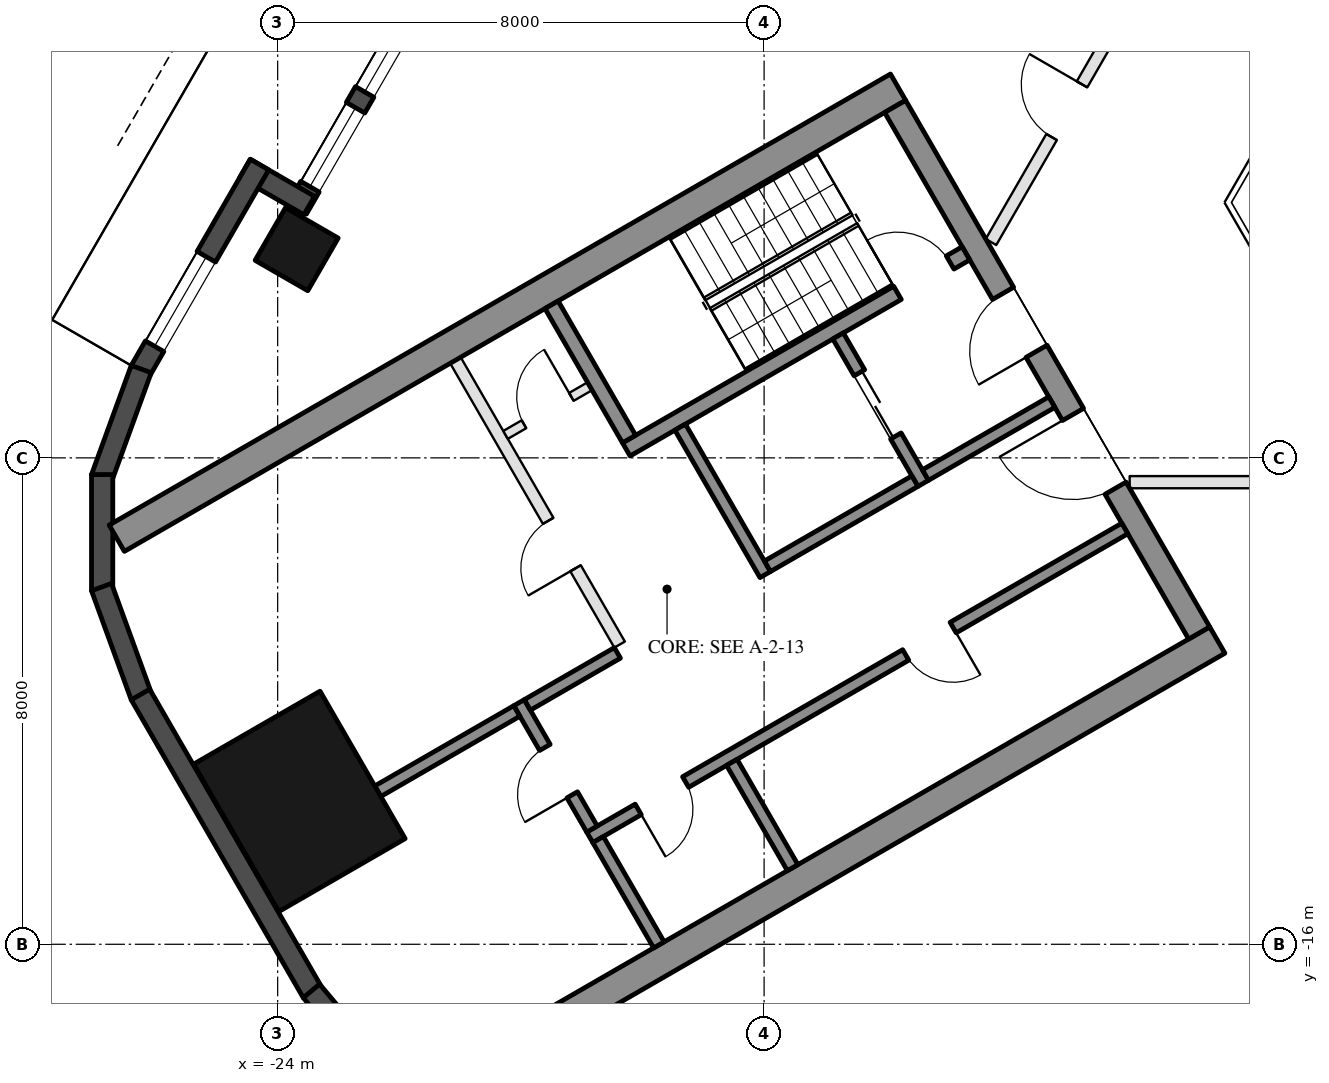
"""IFC4 building model, lengths in metres.
Left out: names, types, materials, properties, quantities, classifications, styles, units other than length and angle.
Written with IfcOpenShell. Run it as: python <this file> out.ifc"""

import sys

from ifc_helpers import new_model, si_unit, direction, frame, frame_2d, origin, origin_2d, place, context, subcontext, project, spatial, rectangle, hollow_rectangle, extrude, element, fill, save


model = new_model("IFC4")
c1 = context("Model", 3, precision=1e-05, world=origin(), true_north=direction((0.0, 1.0)))
c2 = subcontext(c1, "Body", "Model", "MODEL_VIEW")
j1 = project(units=[si_unit("LENGTHUNIT", "METRE"), si_unit("PLANEANGLEUNIT", "RADIAN")], contexts=[c1])
p1 = place(None, origin())
s1 = spatial("IfcSite", under=j1, at=p1, CompositionType="ELEMENT")
p2 = place(p1, origin())
s2 = spatial("IfcBuilding", under=s1, at=p2, CompositionType="ELEMENT")
p3 = place(p2, frame((0.0, 0.0, 61.3)))
s3 = spatial("IfcBuildingStorey", under=s2, at=p3, CompositionType="ELEMENT", Elevation=61.3)
p4 = place(p3, frame((-23.688, -4.568, 0.0), z_axis=(0.0, 0.0, 1.0), x_axis=(0.5, 0.866025403784, 0.0)))
e1 = element("IfcColumn", 1, at=p4, inside=s3, PredefinedType="COLUMN", context=c2, shape_type="SweptSolid", body=[
    extrude(hollow_rectangle(XDim=1.0, YDim=1.0, WallThickness=0.045, at=origin_2d()), origin(), (0.0, 0.0, 1.0), 3.7),
])
p5 = place(p3, frame((-23.643, -13.65, 0.0), z_axis=(0.0, 0.0, 1.0), x_axis=(-0.5, 0.866025403784, 0.0)))
e2 = element("IfcColumn", 2, at=p5, inside=s3, PredefinedType="COLUMN", context=c2, shape_type="SweptSolid", body=[
    extrude(hollow_rectangle(XDim=2.8, YDim=2.4, WallThickness=0.07, at=origin_2d()), origin(), (0.0, 0.0, 1.0), 3.7),
])
p6 = place(p3, frame((-20.309, 1.934, 0.0), z_axis=(0.0, 0.0, 1.0), x_axis=(-0.499992114976, -0.866029956157, 0.0)))
e3 = element("IfcWall", 3, at=p6, inside=s3, PredefinedType="SOLIDWALL", context=c2, shape_type="SweptSolid", body=[
    extrude(rectangle(XDim=6.74, YDim=0.35, at=frame_2d((3.37, 0.0))), origin(), (0.0, 0.0, 1.0), 3.55),
])
p7 = place(p6, frame((0.32, 0.0, 0.0)))
e4 = element("IfcOpeningElement", 4, at=p7, cuts=e3, PredefinedType="OPENING", context=c2, shape_type="SweptSolid", body=[
    extrude(rectangle(XDim=2.4, YDim=2.4, at=frame_2d((1.2, 1.2))), frame((0.0, 0.185, 0.0), z_axis=(0.0, -1.0, 0.0), x_axis=(1.0, 0.0, 0.0)), (0.0, 0.0, 1.0), 0.37),
])
p8 = place(p6, frame((3.02, 0.0, 0.3)))
e5 = element("IfcOpeningElement", 5, at=p8, cuts=e3, PredefinedType="OPENING", context=c2, shape_type="SweptSolid", body=[
    extrude(rectangle(XDim=1.5, YDim=2.65, at=frame_2d((0.75, 1.325))), frame((0.0, 0.185, 0.0), z_axis=(0.0, -1.0, 0.0), x_axis=(1.0, 0.0, 0.0)), (0.0, 0.0, 1.0), 0.37),
])
p9 = place(p6, frame((4.82, 0.0, 0.3)))
e6 = element("IfcOpeningElement", 6, at=p9, cuts=e3, PredefinedType="OPENING", context=c2, shape_type="SweptSolid", body=[
    extrude(rectangle(XDim=1.5, YDim=2.65, at=frame_2d((0.75, 1.325))), frame((0.0, 0.185, 0.0), z_axis=(0.0, -1.0, 0.0), x_axis=(1.0, 0.0, 0.0)), (0.0, 0.0, 1.0), 0.37),
])
p10 = place(p3, frame((-23.481, -3.85, 0.0), z_axis=(0.0, 0.0, 1.0), x_axis=(-0.866092288191, 0.499884134912, 0.0)))
e7 = element("IfcWall", 7, at=p10, inside=s3, PredefinedType="SOLIDWALL", context=c2, shape_type="SweptSolid", body=[
    extrude(rectangle(XDim=1.22, YDim=0.35, at=frame_2d((0.61, 0.0))), origin(), (0.0, 0.0, 1.0), 3.55),
])
p11 = place(p3, frame((-24.299, -3.176, 0.0), z_axis=(0.0, 0.0, 1.0), x_axis=(-0.500028278809, -0.866009076391, 0.0)))
e8 = element("IfcWall", 8, at=p11, inside=s3, PredefinedType="SOLIDWALL", context=c2, shape_type="SweptSolid", body=[
    extrude(rectangle(XDim=3.916, YDim=0.35, at=frame_2d((1.958, 0.0))), origin(), (0.0, 0.0, 1.0), 3.55),
])
p12 = place(p11, frame((1.75, 0.0, 0.3)))
e9 = element("IfcOpeningElement", 9, at=p12, cuts=e8, PredefinedType="OPENING", context=c2, shape_type="SweptSolid", body=[
    extrude(rectangle(XDim=1.7, YDim=2.65, at=frame_2d((0.85, 1.325))), frame((0.0, 0.185, 0.0), z_axis=(0.0, -1.0, 0.0), x_axis=(1.0, 0.0, 0.0)), (0.0, 0.0, 1.0), 0.37),
])
for number, where, z_axis, x_axis in (
    (10, (-26.244, -6.54, 0.0), (0.0, 0.0, 1.0), (-0.342, -0.94, 0.0)),
    (11, (-26.886, -8.275, 0.0), (0.0, 0.0, 1.0), (0.0, -1.0, 0.0)),
    (12, (-26.897, -10.125, 0.0), (0.0, 0.0, 1.0), (0.342, -0.94, 0.0)),
):
    element("IfcWall", number, at=place(p3, frame(where, z_axis=z_axis, x_axis=x_axis)), inside=s3, PredefinedType="SOLIDWALL", context=c2, shape_type="SweptSolid", body=[
        extrude(rectangle(XDim=1.91, YDim=0.35, at=frame_2d((0.955, 0.0))), origin(), (0.0, 0.0, 1.0), 3.55),
    ])
p13 = place(p3, frame((-26.257, -11.893, 0.0), z_axis=(0.0, 0.0, 1.0), x_axis=(0.500018773155, -0.866014564827, 0.0)))
e13 = element("IfcWall", 13, at=p13, inside=s3, PredefinedType="SOLIDWALL", context=c2, shape_type="SweptSolid", body=[
    extrude(rectangle(XDim=5.658, YDim=0.35, at=frame_2d((2.829, 0.0))), origin(), (0.0, 0.0, 1.0), 3.55),
])
p14 = place(p3, frame((-23.445, -16.768, 0.0), z_axis=(0.0, 0.0, 1.0), x_axis=(0.642733291068, -0.76609001857, 0.0)))
e14 = element("IfcWall", 14, at=p14, inside=s3, PredefinedType="SOLIDWALL", context=c2, shape_type="SweptSolid", body=[
    extrude(rectangle(XDim=1.91, YDim=0.35, at=frame_2d((0.955, 0.0))), origin(), (0.0, 0.0, 1.0), 3.55),
])
for number, where, z_axis, x_axis in (
    (15, (-13.797, -1.903, 0.0), (0.0, 0.0, 1.0), (-0.866, -0.5, 0.0)),
    (16, (-8.547, -10.997, 0.0), (0.0, 0.0, 1.0), (-0.866, -0.5, 0.0)),
):
    element("IfcWall", number, at=place(p3, frame(where, z_axis=z_axis, x_axis=x_axis)), inside=s3, PredefinedType="SHEAR", context=c2, shape_type="SweptSolid", body=[
        extrude(rectangle(XDim=14.837, YDim=0.5, at=frame_2d((7.418, 0.0))), origin(), (0.0, 0.0, 1.0), 3.5),
    ])
p15 = place(p3, frame((-13.845, -2.22, 0.0), z_axis=(0.0, 0.0, 1.0), x_axis=(0.500004234368, -0.866022959057, 0.0)))
e17 = element("IfcWall", 17, at=p15, inside=s3, PredefinedType="SHEAR", context=c2, shape_type="SweptSolid", body=[
    extrude(rectangle(XDim=10.0, YDim=0.4, at=frame_2d((5.0, 0.0))), origin(), (0.0, 0.0, 1.0), 3.5),
])
p16 = place(p15, frame((3.55, 0.0, 0.0)))
e18 = element("IfcOpeningElement", 18, at=p16, cuts=e17, PredefinedType="OPENING", context=c2, shape_type="SweptSolid", body=[
    extrude(rectangle(XDim=1.1, YDim=2.1, at=frame_2d((0.55, 1.05))), frame((0.0, 0.21, 0.0), z_axis=(0.0, -1.0, 0.0), x_axis=(1.0, 0.0, 0.0)), (0.0, 0.0, 1.0), 0.42),
])
p17 = place(p15, frame((5.85, 0.0, 0.0)))
e19 = element("IfcOpeningElement", 19, at=p17, cuts=e17, PredefinedType="OPENING", context=c2, shape_type="SweptSolid", body=[
    extrude(rectangle(XDim=1.4, YDim=2.1, at=frame_2d((0.7, 1.05))), frame((0.0, 0.21, 0.0), z_axis=(0.0, -1.0, 0.0), x_axis=(1.0, 0.0, 0.0)), (0.0, 0.0, 1.0), 0.42),
])
p18 = place(p3, frame((-12.681, -4.636, 0.0), z_axis=(0.0, 0.0, 1.0), x_axis=(-0.866021702275, -0.500006411147, 0.0)))
e20 = element("IfcWall", 20, at=p18, inside=s3, PredefinedType="SHEAR", context=c2, shape_type="SweptSolid", body=[
    extrude(rectangle(XDim=6.45, YDim=0.25, at=frame_2d((3.225, 0.0))), origin(), (0.0, 0.0, 1.0), 3.5),
])
p19 = place(p18, frame((0.3, 0.0, 0.0)))
e21 = element("IfcOpeningElement", 21, at=p19, cuts=e20, PredefinedType="OPENING", context=c2, shape_type="SweptSolid", body=[
    extrude(rectangle(XDim=1.0, YDim=2.1, at=frame_2d((0.5, 1.05))), frame((0.0, 0.135, 0.0), z_axis=(0.0, -1.0, 0.0), x_axis=(1.0, 0.0, 0.0)), (0.0, 0.0, 1.0), 0.27),
])
p20 = place(p3, frame((-19.496, -5.482, 0.0), z_axis=(0.0, 0.0, 1.0), x_axis=(0.499990435942, -0.866030925526, 0.0)))
e22 = element("IfcWall", 22, at=p20, inside=s3, PredefinedType="SHEAR", context=c2, shape_type="SweptSolid", body=[
    extrude(rectangle(XDim=2.55, YDim=0.25, at=frame_2d((1.275, 0.0))), origin(), (0.0, 0.0, 1.0), 3.5),
])
p21 = place(p3, frame((-17.381, -7.495, 0.0), z_axis=(0.0, 0.0, 1.0), x_axis=(0.500011755427, -0.866018616679, 0.0)))
e23 = element("IfcWall", 23, at=p21, inside=s3, PredefinedType="SHEAR", context=c2, shape_type="SweptSolid", body=[
    extrude(rectangle(XDim=2.8, YDim=0.2, at=frame_2d((1.4, 0.0))), origin(), (0.0, 0.0, 1.0), 3.5),
])
p22 = place(p3, frame((-14.783, -5.995, 0.0), z_axis=(0.0, 0.0, 1.0), x_axis=(0.49994636267, -0.866056369097, 0.0)))
e24 = element("IfcWall", 24, at=p22, inside=s3, PredefinedType="SHEAR", context=c2, shape_type="SweptSolid", body=[
    extrude(rectangle(XDim=2.8, YDim=0.2, at=frame_2d((1.4, 0.0))), origin(), (0.0, 0.0, 1.0), 3.5),
])
p23 = place(p22, frame((0.7, 0.0, 0.0)))
e25 = element("IfcOpeningElement", 25, at=p23, cuts=e24, PredefinedType="OPENING", context=c2, shape_type="SweptSolid", body=[
    extrude(rectangle(XDim=1.2, YDim=2.1, at=frame_2d((0.6, 1.05))), frame((0.0, 0.11, 0.0), z_axis=(0.0, -1.0, 0.0), x_axis=(1.0, 0.0, 0.0)), (0.0, 0.0, 1.0), 0.22),
])
p24 = place(p3, frame((-13.52, -8.383, 0.0), z_axis=(0.0, 0.0, 1.0), x_axis=(-0.866034573852, -0.49998411664, 0.0)))
e26 = element("IfcWall", 26, at=p24, inside=s3, PredefinedType="SHEAR", context=c2, shape_type="SweptSolid", body=[
    extrude(rectangle(XDim=2.8, YDim=0.2, at=frame_2d((1.4, 0.0))), origin(), (0.0, 0.0, 1.0), 3.5),
])
p25 = place(p3, frame((-11.268, -7.083, 0.0), z_axis=(0.0, 0.0, 1.0), x_axis=(-0.866050077142, -0.499957262057, 0.0)))
e27 = element("IfcWall", 27, at=p25, inside=s3, PredefinedType="SHEAR", context=c2, shape_type="SweptSolid", body=[
    extrude(rectangle(XDim=2.4, YDim=0.2, at=frame_2d((1.2, 0.0))), origin(), (0.0, 0.0, 1.0), 3.5),
])
p26 = place(p3, frame((-10.068, -9.162, 0.0), z_axis=(0.0, 0.0, 1.0), x_axis=(-0.866032725843, -0.499987317609, 0.0)))
e28 = element("IfcWall", 28, at=p26, inside=s3, PredefinedType="SHEAR", context=c2, shape_type="SweptSolid", body=[
    extrude(rectangle(XDim=10.16, YDim=0.2, at=frame_2d((5.08, 0.0))), origin(), (0.0, 0.0, 1.0), 3.5),
])
p27 = place(p26, frame((3.26, 0.0, 0.0)))
e29 = element("IfcOpeningElement", 29, at=p27, cuts=e28, PredefinedType="OPENING", context=c2, shape_type="SweptSolid", body=[
    extrude(rectangle(XDim=0.9, YDim=2.1, at=frame_2d((0.45, 1.05))), frame((0.0, 0.11, 0.0), z_axis=(0.0, -1.0, 0.0), x_axis=(1.0, 0.0, 0.0)), (0.0, 0.0, 1.0), 0.22),
])
p28 = place(p26, frame((8.34, 0.0, 0.0)))
e30 = element("IfcOpeningElement", 30, at=p28, cuts=e28, PredefinedType="OPENING", context=c2, shape_type="SweptSolid", body=[
    extrude(rectangle(XDim=0.9, YDim=2.1, at=frame_2d((0.45, 1.05))), frame((0.0, 0.11, 0.0), z_axis=(0.0, -1.0, 0.0), x_axis=(1.0, 0.0, 0.0)), (0.0, 0.0, 1.0), 0.22),
])
p29 = place(p3, frame((-20.031, -12.026, 0.0), z_axis=(0.0, 0.0, 1.0), x_axis=(0.500033551112, -0.866006032174, 0.0)))
e31 = element("IfcWall", 31, at=p29, inside=s3, PredefinedType="SHEAR", context=c2, shape_type="SweptSolid", body=[
    extrude(rectangle(XDim=2.4, YDim=0.2, at=frame_2d((1.2, 0.0))), origin(), (0.0, 0.0, 1.0), 3.5),
])
p30 = place(p29, frame((0.85, 0.0, 0.0)))
e32 = element("IfcOpeningElement", 32, at=p30, cuts=e31, PredefinedType="OPENING", context=c2, shape_type="SweptSolid", body=[
    extrude(rectangle(XDim=0.9, YDim=2.1, at=frame_2d((0.45, 1.05))), frame((0.0, 0.11, 0.0), z_axis=(0.0, -1.0, 0.0), x_axis=(1.0, 0.0, 0.0)), (0.0, 0.0, 1.0), 0.22),
])
p31 = place(p3, frame((-18.413, -11.208, 0.0), z_axis=(0.0, 0.0, 1.0), x_axis=(-0.866038183914, -0.499977863513, 0.0)))
e33 = element("IfcWall", 33, at=p31, inside=s3, PredefinedType="SHEAR", context=c2, shape_type="SweptSolid", body=[
    extrude(rectangle(XDim=1.71, YDim=0.2, at=frame_2d((0.855, 0.0))), origin(), (0.0, 0.0, 1.0), 3.5),
])
for number, where, z_axis, x_axis in (
    (34, (-16.531, -13.008, 0.0), (0.0, 0.0, 1.0), (0.5, -0.866, 0.0)),
    (35, (-18.73, -14.278, 0.0), (0.0, 0.0, 1.0), (0.5, -0.866, 0.0)),
):
    element("IfcWall", number, at=place(p3, frame(where, z_axis=z_axis, x_axis=x_axis)), inside=s3, PredefinedType="SHEAR", context=c2, shape_type="SweptSolid", body=[
        extrude(rectangle(XDim=2.0, YDim=0.2, at=frame_2d((1.0, 0.0))), origin(), (0.0, 0.0, 1.0), 3.5),
    ])
p32 = place(p3, frame((-20.067, -12.163, 0.0), z_axis=(0.0, 0.0, 1.0), x_axis=(-0.866060851709, -0.499938597367, 0.0)))
e36 = element("IfcWall", 36, at=p32, inside=s3, PredefinedType="SHEAR", context=c2, shape_type="SweptSolid", body=[
    extrude(rectangle(XDim=2.64, YDim=0.2, at=frame_2d((1.32, 0.0))), origin(), (0.0, 0.0, 1.0), 3.5),
])
p33 = place(p3, frame((-21.076, -6.395, 0.0), z_axis=(0.0, 0.0, 1.0), x_axis=(0.50001468107, -0.866016927499, 0.0)))
e37 = element("IfcWall", 37, at=p33, inside=s3, PredefinedType="PARTITIONING", context=c2, shape_type="SweptSolid", body=[
    extrude(rectangle(XDim=5.4, YDim=0.2, at=frame_2d((2.7, 0.0))), origin(), (0.0, 0.0, 1.0), 3.5),
])
p34 = place(p33, frame((3.05, 0.0, 0.0)))
e38 = element("IfcOpeningElement", 38, at=p34, cuts=e37, PredefinedType="OPENING", context=c2, shape_type="SweptSolid", body=[
    extrude(rectangle(XDim=0.9, YDim=2.1, at=frame_2d((0.45, 1.05))), frame((0.0, 0.11, 0.0), z_axis=(0.0, -1.0, 0.0), x_axis=(1.0, 0.0, 0.0)), (0.0, 0.0, 1.0), 0.22),
])
p35 = place(p3, frame((-18.866, -6.822, 0.0), z_axis=(0.0, 0.0, 1.0), x_axis=(-0.866028054938, -0.499995408039, 0.0)))
e39 = element("IfcWall", 39, at=p35, inside=s3, PredefinedType="PARTITIONING", context=c2, shape_type="SweptSolid", body=[
    extrude(rectangle(XDim=1.6, YDim=0.15, at=frame_2d((0.8, 0.0))), origin(), (0.0, 0.0, 1.0), 3.5),
])
p36 = place(p35, frame((0.35, 0.0, 0.0)))
e40 = element("IfcOpeningElement", 40, at=p36, cuts=e39, PredefinedType="OPENING", context=c2, shape_type="SweptSolid", body=[
    extrude(rectangle(XDim=0.9, YDim=2.1, at=frame_2d((0.45, 1.05))), frame((0.0, 0.085, 0.0), z_axis=(0.0, -1.0, 0.0), x_axis=(1.0, 0.0, 0.0)), (0.0, 0.0, 1.0), 0.17),
])
p37 = place(p3, frame((-0.1, -8.4, 0.0), z_axis=(0.0, 0.0, 1.0), x_axis=(-1.0, 0.0, 0.0)))
e41 = element("IfcWall", 41, at=p37, inside=s3, PredefinedType="PARTITIONING", context=c2, shape_type="SweptSolid", body=[
    extrude(rectangle(XDim=9.888, YDim=0.2, at=frame_2d((4.944, 0.0))), origin(), (0.0, 0.0, 1.0), 2.95),
])
p38 = place(p37, frame((4.444, 0.0, 0.0)))
e42 = element("IfcOpeningElement", 42, at=p38, cuts=e41, PredefinedType="OPENING", context=c2, shape_type="SweptSolid", body=[
    extrude(rectangle(XDim=1.0, YDim=2.1, at=frame_2d((0.5, 1.05))), frame((0.0, 0.11, 0.0), z_axis=(0.0, -1.0, 0.0), x_axis=(1.0, 0.0, 0.0)), (0.0, 0.0, 1.0), 0.22),
])
p39 = place(p3, frame((-12.269, -4.45, 0.0), z_axis=(0.0, 0.0, 1.0), x_axis=(0.500013374061, 0.866017682129, 0.0)))
e43 = element("IfcWall", 43, at=p39, inside=s3, PredefinedType="PARTITIONING", context=c2, shape_type="SweptSolid", body=[
    extrude(rectangle(XDim=4.988, YDim=0.2, at=frame_2d((2.494, 0.0))), origin(), (0.0, 0.0, 1.0), 2.95),
])
p40 = place(p39, frame((1.994, 0.0, 0.0)))
e44 = element("IfcOpeningElement", 44, at=p40, cuts=e43, PredefinedType="OPENING", context=c2, shape_type="SweptSolid", body=[
    extrude(rectangle(XDim=1.0, YDim=2.1, at=frame_2d((0.5, 1.05))), frame((0.0, 0.11, 0.0), z_axis=(0.0, -1.0, 0.0), x_axis=(1.0, 0.0, 0.0)), (0.0, 0.0, 1.0), 0.22),
])
p41 = place(p8, origin())
e45 = element("IfcWindow", 45, at=p41, inside=s3, PartitioningType="SINGLE_PANEL", PredefinedType="WINDOW", context=c2, shape_type="SweptSolid", body=[
    extrude(rectangle(XDim=1.5, YDim=2.65, at=frame_2d((0.75, 1.325))), frame((0.0, 0.03, 0.0), z_axis=(0.0, -1.0, 0.0), x_axis=(1.0, 0.0, 0.0)), (0.0, 0.0, 1.0), 0.06),
])
fill(e5, e45)
p42 = place(p9, origin())
e46 = element("IfcWindow", 46, at=p42, inside=s3, PartitioningType="SINGLE_PANEL", PredefinedType="WINDOW", context=c2, shape_type="SweptSolid", body=[
    extrude(rectangle(XDim=1.5, YDim=2.65, at=frame_2d((0.75, 1.325))), frame((0.0, 0.03, 0.0), z_axis=(0.0, -1.0, 0.0), x_axis=(1.0, 0.0, 0.0)), (0.0, 0.0, 1.0), 0.06),
])
fill(e6, e46)
p43 = place(p12, origin())
e47 = element("IfcWindow", 47, at=p43, inside=s3, PartitioningType="SINGLE_PANEL", PredefinedType="WINDOW", context=c2, shape_type="SweptSolid", body=[
    extrude(rectangle(XDim=1.7, YDim=2.65, at=frame_2d((0.85, 1.325))), frame((0.0, 0.03, 0.0), z_axis=(0.0, -1.0, 0.0), x_axis=(1.0, 0.0, 0.0)), (0.0, 0.0, 1.0), 0.06),
])
fill(e9, e47)
p44 = place(p23, origin())
e48 = element("IfcDoor", 48, at=p44, inside=s3, OperationType="DOUBLE_DOOR_SLIDING", PredefinedType="DOOR", context=c2, shape_type="SweptSolid", body=[
    extrude(rectangle(XDim=1.2, YDim=2.1, at=frame_2d((0.6, 1.05))), frame((0.0, 0.025, 0.0), z_axis=(0.0, -1.0, 0.0), x_axis=(1.0, 0.0, 0.0)), (0.0, 0.0, 1.0), 0.05),
])
fill(e25, e48)
p45 = place(p36, frame((0.9, 0.0, 0.0), z_axis=(0.0, 0.0, 1.0), x_axis=(-1.0, 0.0, 0.0)))
e49 = element("IfcDoor", 49, at=p45, inside=s3, OperationType="SINGLE_SWING_RIGHT", PredefinedType="DOOR", context=c2, shape_type="SweptSolid", body=[
    extrude(rectangle(XDim=0.9, YDim=2.1, at=frame_2d((0.45, 1.05))), frame((0.0, 0.025, 0.0), z_axis=(0.0, -1.0, 0.0), x_axis=(1.0, 0.0, 0.0)), (0.0, 0.0, 1.0), 0.05),
])
fill(e40, e49)
p46 = place(p27, origin())
e50 = element("IfcDoor", 50, at=p46, inside=s3, OperationType="SINGLE_SWING_LEFT", PredefinedType="DOOR", context=c2, shape_type="SweptSolid", body=[
    extrude(rectangle(XDim=0.9, YDim=2.1, at=frame_2d((0.45, 1.05))), frame((0.0, 0.025, 0.0), z_axis=(0.0, -1.0, 0.0), x_axis=(1.0, 0.0, 0.0)), (0.0, 0.0, 1.0), 0.05),
])
fill(e29, e50)
p47 = place(p28, origin())
e51 = element("IfcDoor", 51, at=p47, inside=s3, OperationType="SINGLE_SWING_RIGHT", PredefinedType="DOOR", context=c2, shape_type="SweptSolid", body=[
    extrude(rectangle(XDim=0.9, YDim=2.1, at=frame_2d((0.45, 1.05))), frame((0.0, 0.025, 0.0), z_axis=(0.0, -1.0, 0.0), x_axis=(1.0, 0.0, 0.0)), (0.0, 0.0, 1.0), 0.05),
])
fill(e30, e51)
p48 = place(p30, frame((0.9, 0.0, 0.0), z_axis=(0.0, 0.0, 1.0), x_axis=(-1.0, 0.0, 0.0)))
e52 = element("IfcDoor", 52, at=p48, inside=s3, OperationType="SINGLE_SWING_LEFT", PredefinedType="DOOR", context=c2, shape_type="SweptSolid", body=[
    extrude(rectangle(XDim=0.9, YDim=2.1, at=frame_2d((0.45, 1.05))), frame((0.0, 0.025, 0.0), z_axis=(0.0, -1.0, 0.0), x_axis=(1.0, 0.0, 0.0)), (0.0, 0.0, 1.0), 0.05),
])
fill(e32, e52)
p49 = place(p34, frame((0.9, 0.0, 0.0), z_axis=(0.0, 0.0, 1.0), x_axis=(-1.0, 0.0, 0.0)))
e53 = element("IfcDoor", 53, at=p49, inside=s3, OperationType="SINGLE_SWING_LEFT", PredefinedType="DOOR", context=c2, shape_type="SweptSolid", body=[
    extrude(rectangle(XDim=0.9, YDim=2.1, at=frame_2d((0.45, 1.05))), frame((0.0, 0.025, 0.0), z_axis=(0.0, -1.0, 0.0), x_axis=(1.0, 0.0, 0.0)), (0.0, 0.0, 1.0), 0.05),
])
fill(e38, e53)
p50 = place(p16, frame((1.1, 0.0, 0.0), z_axis=(0.0, 0.0, 1.0), x_axis=(-1.0, 0.0, 0.0)))
e54 = element("IfcDoor", 54, at=p50, inside=s3, OperationType="SINGLE_SWING_LEFT", PredefinedType="DOOR", context=c2, shape_type="SweptSolid", body=[
    extrude(rectangle(XDim=1.1, YDim=2.1, at=frame_2d((0.55, 1.05))), frame((0.0, 0.025, 0.0), z_axis=(0.0, -1.0, 0.0), x_axis=(1.0, 0.0, 0.0)), (0.0, 0.0, 1.0), 0.05),
])
fill(e18, e54)
p51 = place(p17, frame((1.4, 0.0, 0.0), z_axis=(0.0, 0.0, 1.0), x_axis=(-1.0, 0.0, 0.0)))
e55 = element("IfcDoor", 55, at=p51, inside=s3, OperationType="DOUBLE_DOOR_SINGLE_SWING", PredefinedType="DOOR", context=c2, shape_type="SweptSolid", body=[
    extrude(rectangle(XDim=1.4, YDim=2.1, at=frame_2d((0.7, 1.05))), frame((0.0, 0.025, 0.0), z_axis=(0.0, -1.0, 0.0), x_axis=(1.0, 0.0, 0.0)), (0.0, 0.0, 1.0), 0.05),
])
fill(e19, e55)
p52 = place(p19, frame((1.0, 0.0, 0.0), z_axis=(0.0, 0.0, 1.0), x_axis=(-1.0, 0.0, 0.0)))
e56 = element("IfcDoor", 56, at=p52, inside=s3, OperationType="SINGLE_SWING_LEFT", PredefinedType="DOOR", context=c2, shape_type="SweptSolid", body=[
    extrude(rectangle(XDim=1.0, YDim=2.1, at=frame_2d((0.5, 1.05))), frame((0.0, 0.025, 0.0), z_axis=(0.0, -1.0, 0.0), x_axis=(1.0, 0.0, 0.0)), (0.0, 0.0, 1.0), 0.05),
])
fill(e21, e56)
p53 = place(p40, origin())
e57 = element("IfcDoor", 57, at=p53, inside=s3, OperationType="SINGLE_SWING_RIGHT", PredefinedType="DOOR", context=c2, shape_type="SweptSolid", body=[
    extrude(rectangle(XDim=1.0, YDim=2.1, at=frame_2d((0.5, 1.05))), frame((0.0, 0.025, 0.0), z_axis=(0.0, -1.0, 0.0), x_axis=(1.0, 0.0, 0.0)), (0.0, 0.0, 1.0), 0.05),
])
fill(e44, e57)
save(model, sys.argv[1])
